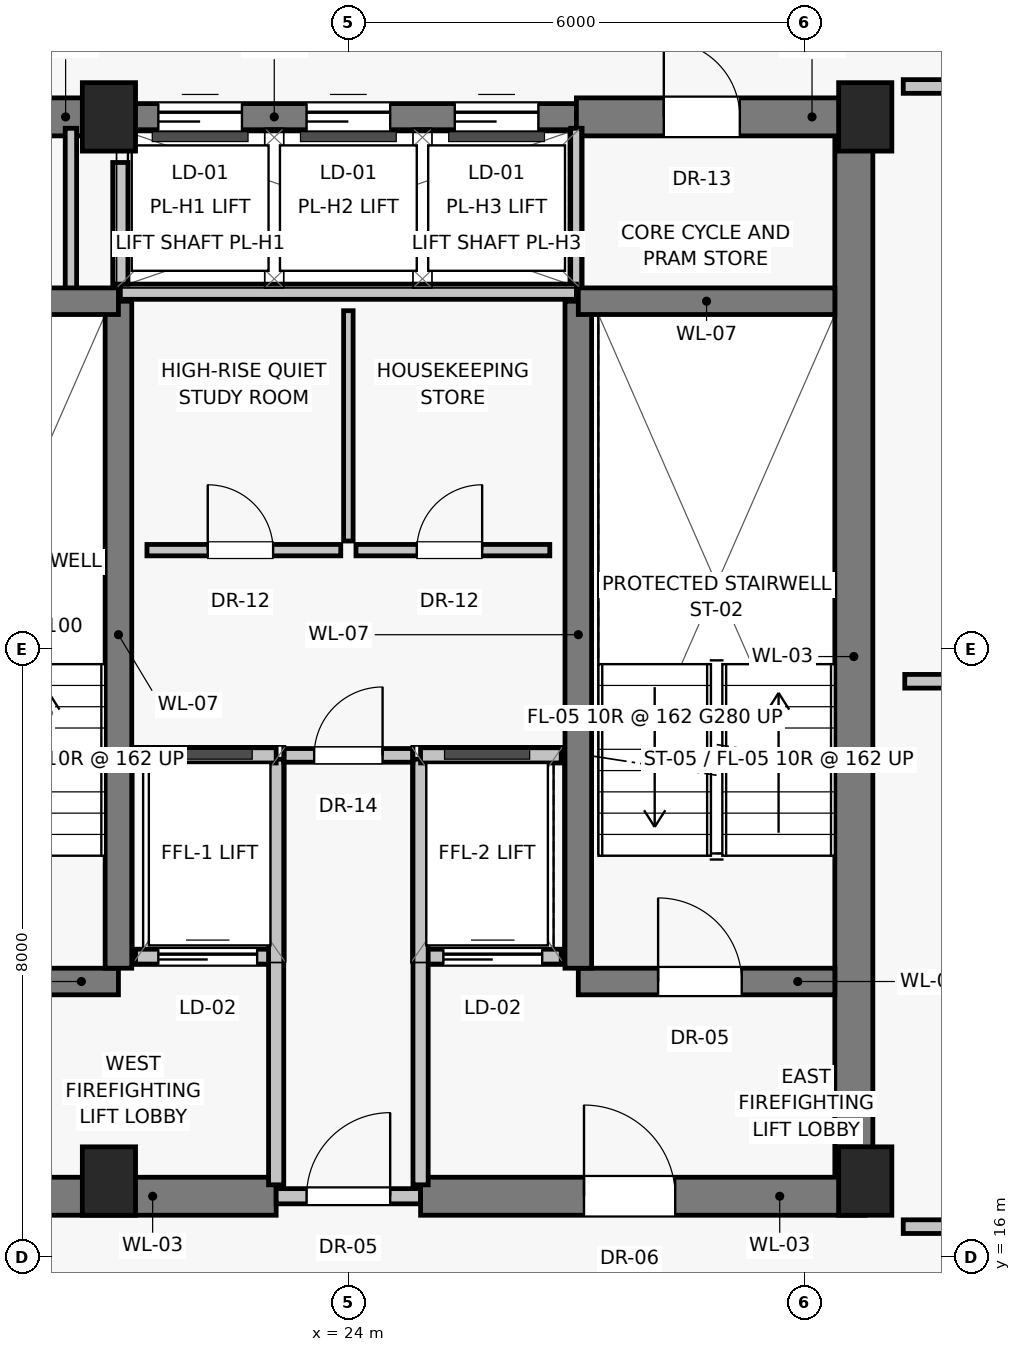
"""IFC4 building model, lengths in metres.
Left out: names, types, materials, properties, quantities, classifications, styles, units other than length and angle.
Written with IfcOpenShell. Run it as: python <this file> out.ifc"""

import sys

from ifc_helpers import new_model, si_unit, direction, frame, frame_2d, origin, origin_2d, place, context, subcontext, project, spatial, rectangle, extrude, source, transform, mapped, element, fill, save


model = new_model("IFC4")
c1 = context("Model", 3, precision=1e-05, world=origin(), true_north=direction((0.0, 1.0)))
c2 = subcontext(c1, "Body", "Model", "MODEL_VIEW")
j1 = project(units=[si_unit("LENGTHUNIT", "METRE"), si_unit("PLANEANGLEUNIT", "RADIAN")], contexts=[c1])
p1 = place(None, origin())
s1 = spatial("IfcSite", under=j1, at=p1, CompositionType="ELEMENT")
p2 = place(p1, origin())
s2 = spatial("IfcBuilding", under=s1, at=p2, CompositionType="ELEMENT")
p3 = place(p2, frame((0.0, 0.0, 248.0)))
s3 = spatial("IfcBuildingStorey", under=s2, at=p3, CompositionType="ELEMENT", Elevation=248.0)
for number, where, z_axis, x_axis in (
    (1, (20.85, 17.0, 0.0), (0.0, 0.0, 1.0), (1.0, 0.0, 0.0)),
    (2, (30.8, 17.0, 0.0), (0.0, 0.0, 1.0), (1.0, 0.0, 0.0)),
    (3, (20.85, 31.0, 0.0), (0.0, 0.0, 1.0), (1.0, 0.0, 0.0)),
    (4, (30.8, 31.0, 0.0), (0.0, 0.0, 1.0), (1.0, 0.0, 0.0)),
):
    element("IfcColumn", number, at=place(p3, frame(where, z_axis=z_axis, x_axis=x_axis)), inside=s3, PredefinedType="PILASTER", context=c2, shape_type="SweptSolid", body=[
        extrude(rectangle(XDim=0.7, YDim=0.9, at=origin_2d()), origin(), (0.0, 0.0, 1.0), 3.25),
    ])
p4 = place(p3, frame((30.65, 16.8, 0.0), z_axis=(0.0, 0.0, 1.0), x_axis=(0.0, 1.0, 0.0)))
e5 = element("IfcWall", 5, at=p4, inside=s3, PredefinedType="SHEAR", context=c2, shape_type="SweptSolid", body=[
    extrude(rectangle(XDim=14.2, YDim=0.5, at=frame_2d((7.1, 0.0))), origin(), (0.0, 0.0, 1.0), 3.015),
])
p5 = place(p3, frame((17.2, 16.8, 0.0), z_axis=(0.0, 0.0, 1.0), x_axis=(1.0, 0.0, 0.0)))
e6 = element("IfcWall", 6, at=p5, inside=s3, PredefinedType="SHEAR", context=c2, shape_type="SweptSolid", body=[
    extrude(rectangle(XDim=5.85, YDim=0.5, at=frame_2d((2.925, 0.0))), origin(), (0.0, 0.0, 1.0), 3.015),
])
p6 = place(p5, frame((1.15, 0.0, 0.0)))
e7 = element("IfcOpeningElement", 7, at=p6, cuts=e6, PredefinedType="OPENING", context=c2, shape_type="SweptSolid", body=[
    extrude(rectangle(XDim=1.2, YDim=2.03, at=frame_2d((0.6, 1.015))), frame((0.0, 0.26, 0.0), z_axis=(0.0, -1.0, 0.0), x_axis=(1.0, 0.0, 0.0)), (0.0, 0.0, 1.0), 0.52),
])
p7 = place(p3, frame((23.05, 16.8, 0.0), z_axis=(0.0, 0.0, 1.0), x_axis=(1.0, 0.0, 0.0)))
e8 = element("IfcWall", 8, at=p7, inside=s3, PredefinedType="SOLIDWALL", context=c2, shape_type="SweptSolid", body=[
    extrude(rectangle(XDim=1.9, YDim=0.2, at=frame_2d((0.95, 0.0))), origin(), (0.0, 0.0, 1.0), 2.165),
])
p8 = place(p7, frame((0.4, 0.0, 0.0)))
e9 = element("IfcOpeningElement", 9, at=p8, cuts=e8, PredefinedType="OPENING", context=c2, shape_type="SweptSolid", body=[
    extrude(rectangle(XDim=1.1, YDim=2.03, at=frame_2d((0.55, 1.015))), frame((0.0, 0.11, 0.0), z_axis=(0.0, -1.0, 0.0), x_axis=(1.0, 0.0, 0.0)), (0.0, 0.0, 1.0), 0.22),
])
p9 = place(p3, frame((24.95, 16.8, 0.0), z_axis=(0.0, 0.0, 1.0), x_axis=(1.0, 0.0, 0.0)))
e10 = element("IfcWall", 10, at=p9, inside=s3, PredefinedType="SHEAR", context=c2, shape_type="SweptSolid", body=[
    extrude(rectangle(XDim=5.85, YDim=0.5, at=frame_2d((2.925, 0.0))), origin(), (0.0, 0.0, 1.0), 3.015),
])
p10 = place(p9, frame((2.15, 0.0, 0.0)))
e11 = element("IfcOpeningElement", 11, at=p10, cuts=e10, PredefinedType="OPENING", context=c2, shape_type="SweptSolid", body=[
    extrude(rectangle(XDim=1.2, YDim=2.03, at=frame_2d((0.6, 1.015))), frame((0.0, 0.26, 0.0), z_axis=(0.0, -1.0, 0.0), x_axis=(1.0, 0.0, 0.0)), (0.0, 0.0, 1.0), 0.52),
])
p11 = place(p3, frame((17.2, 31.0, 0.0), z_axis=(0.0, 0.0, 1.0), x_axis=(1.0, 0.0, 0.0)))
e12 = element("IfcWall", 12, at=p11, inside=s3, PredefinedType="SHEAR", context=c2, shape_type="SweptSolid", body=[
    extrude(rectangle(XDim=3.8, YDim=0.5, at=frame_2d((1.9, 0.0))), origin(), (0.0, 0.0, 1.0), 3.015),
])
p12 = place(p11, frame((1.25, 0.0, 0.0)))
e13 = element("IfcOpeningElement", 13, at=p12, cuts=e12, PredefinedType="OPENING", context=c2, shape_type="SweptSolid", body=[
    extrude(rectangle(XDim=0.86, YDim=2.01, at=frame_2d((0.43, 1.005))), frame((0.0, 0.26, 0.0), z_axis=(0.0, -1.0, 0.0), x_axis=(1.0, 0.0, 0.0)), (0.0, 0.0, 1.0), 0.52),
])
p13 = place(p3, frame((21.0, 31.0, 0.0), z_axis=(0.0, 0.0, 1.0), x_axis=(1.0, 0.0, 0.0)))
e14 = element("IfcWall", 14, at=p13, inside=s3, PredefinedType="SHEAR", context=c2, shape_type="SweptSolid", body=[
    extrude(rectangle(XDim=6.0, YDim=0.35, at=frame_2d((3.0, 0.0))), origin(), (0.0, 0.0, 1.0), 3.015),
])
p14 = place(p13, frame((0.5, 0.0, 0.0)))
e15 = element("IfcOpeningElement", 15, at=p14, cuts=e14, PredefinedType="OPENING", context=c2, shape_type="SweptSolid", body=[
    extrude(rectangle(XDim=1.1, YDim=2.08, at=frame_2d((0.55, 1.04))), frame((0.0, 0.185, 0.0), z_axis=(0.0, -1.0, 0.0), x_axis=(1.0, 0.0, 0.0)), (0.0, 0.0, 1.0), 0.37),
])
p15 = place(p13, frame((2.45, 0.0, 0.0)))
e16 = element("IfcOpeningElement", 16, at=p15, cuts=e14, PredefinedType="OPENING", context=c2, shape_type="SweptSolid", body=[
    extrude(rectangle(XDim=1.1, YDim=2.08, at=frame_2d((0.55, 1.04))), frame((0.0, 0.185, 0.0), z_axis=(0.0, -1.0, 0.0), x_axis=(1.0, 0.0, 0.0)), (0.0, 0.0, 1.0), 0.37),
])
p16 = place(p13, frame((4.4, 0.0, 0.0)))
e17 = element("IfcOpeningElement", 17, at=p16, cuts=e14, PredefinedType="OPENING", context=c2, shape_type="SweptSolid", body=[
    extrude(rectangle(XDim=1.1, YDim=2.08, at=frame_2d((0.55, 1.04))), frame((0.0, 0.185, 0.0), z_axis=(0.0, -1.0, 0.0), x_axis=(1.0, 0.0, 0.0)), (0.0, 0.0, 1.0), 0.37),
])
p17 = place(p3, frame((27.0, 31.0, 0.0), z_axis=(0.0, 0.0, 1.0), x_axis=(1.0, 0.0, 0.0)))
e18 = element("IfcWall", 18, at=p17, inside=s3, PredefinedType="SHEAR", context=c2, shape_type="SweptSolid", body=[
    extrude(rectangle(XDim=3.8, YDim=0.5, at=frame_2d((1.9, 0.0))), origin(), (0.0, 0.0, 1.0), 3.015),
])
p18 = place(p17, frame((1.15, 0.0, 0.0)))
e19 = element("IfcOpeningElement", 19, at=p18, cuts=e18, PredefinedType="OPENING", context=c2, shape_type="SweptSolid", body=[
    extrude(rectangle(XDim=1.0, YDim=2.01, at=frame_2d((0.5, 1.005))), frame((0.0, 0.26, 0.0), z_axis=(0.0, -1.0, 0.0), x_axis=(1.0, 0.0, 0.0)), (0.0, 0.0, 1.0), 0.52),
])
for number, where, z_axis, x_axis in (
    (20, (20.35, 28.65, 0.0), (0.0, 0.0, 1.0), (0.0, 1.0, 0.0)),
    (21, (27.0, 28.65, 0.0), (0.0, 0.0, 1.0), (0.0, 1.0, 0.0)),
):
    element("IfcWall", number, at=place(p3, frame(where, z_axis=z_axis, x_axis=x_axis)), inside=s3, PredefinedType="PARTITIONING", context=c2, shape_type="SweptSolid", body=[
        extrude(rectangle(XDim=2.2, YDim=0.15, at=frame_2d((1.1, 0.0))), origin(), (0.0, 0.0, 1.0), 3.015),
    ])
p19 = place(p3, frame((17.6, 19.625, 0.0), z_axis=(0.0, 0.0, 1.0), x_axis=(1.0, 0.0, 0.0)))
e22 = element("IfcWall", 22, at=p19, inside=s3, PredefinedType="SHEAR", context=c2, shape_type="SweptSolid", body=[
    extrude(rectangle(XDim=3.375, YDim=0.35, at=frame_2d((1.688, 0.0))), origin(), (0.0, 0.0, 1.0), 3.015),
])
p20 = place(p19, frame((1.05, 0.0, 0.0)))
e23 = element("IfcOpeningElement", 23, at=p20, cuts=e22, PredefinedType="OPENING", context=c2, shape_type="SweptSolid", body=[
    extrude(rectangle(XDim=1.1, YDim=2.03, at=frame_2d((0.55, 1.015))), frame((0.0, 0.185, 0.0), z_axis=(0.0, -1.0, 0.0), x_axis=(1.0, 0.0, 0.0)), (0.0, 0.0, 1.0), 0.37),
])
p21 = place(p3, frame((21.2, 19.95, 0.0), z_axis=(0.0, 0.0, 1.0), x_axis=(1.0, 0.0, 0.0)))
e24 = element("IfcWall", 24, at=p21, inside=s3, PredefinedType="SOLIDWALL", context=c2, shape_type="SweptSolid", body=[
    extrude(rectangle(XDim=1.85, YDim=0.2, at=frame_2d((0.925, 0.0))), origin(), (0.0, 0.0, 1.0), 3.015),
])
p22 = place(p21, frame((0.3, 0.0, 0.0)))
e25 = element("IfcOpeningElement", 25, at=p22, cuts=e24, PredefinedType="OPENING", context=c2, shape_type="SweptSolid", body=[
    extrude(rectangle(XDim=1.3, YDim=2.25, at=frame_2d((0.65, 1.125))), frame((0.0, 0.11, 0.0), z_axis=(0.0, -1.0, 0.0), x_axis=(1.0, 0.0, 0.0)), (0.0, 0.0, 1.0), 0.22),
])
p23 = place(p3, frame((24.95, 19.95, 0.0), z_axis=(0.0, 0.0, 1.0), x_axis=(1.0, 0.0, 0.0)))
e26 = element("IfcWall", 26, at=p23, inside=s3, PredefinedType="SOLIDWALL", context=c2, shape_type="SweptSolid", body=[
    extrude(rectangle(XDim=1.85, YDim=0.2, at=frame_2d((0.925, 0.0))), origin(), (0.0, 0.0, 1.0), 3.015),
])
p24 = place(p23, frame((0.3, 0.0, 0.0)))
e27 = element("IfcOpeningElement", 27, at=p24, cuts=e26, PredefinedType="OPENING", context=c2, shape_type="SweptSolid", body=[
    extrude(rectangle(XDim=1.3, YDim=2.25, at=frame_2d((0.65, 1.125))), frame((0.0, 0.11, 0.0), z_axis=(0.0, -1.0, 0.0), x_axis=(1.0, 0.0, 0.0)), (0.0, 0.0, 1.0), 0.22),
])
p25 = place(p3, frame((27.025, 19.625, 0.0), z_axis=(0.0, 0.0, 1.0), x_axis=(1.0, 0.0, 0.0)))
e28 = element("IfcWall", 28, at=p25, inside=s3, PredefinedType="SHEAR", context=c2, shape_type="SweptSolid", body=[
    extrude(rectangle(XDim=3.375, YDim=0.35, at=frame_2d((1.688, 0.0))), origin(), (0.0, 0.0, 1.0), 3.015),
])
p26 = place(p25, frame((1.05, 0.0, 0.0)))
e29 = element("IfcOpeningElement", 29, at=p26, cuts=e28, PredefinedType="OPENING", context=c2, shape_type="SweptSolid", body=[
    extrude(rectangle(XDim=1.1, YDim=2.03, at=frame_2d((0.55, 1.015))), frame((0.0, 0.185, 0.0), z_axis=(0.0, -1.0, 0.0), x_axis=(1.0, 0.0, 0.0)), (0.0, 0.0, 1.0), 0.37),
])
for number, where, z_axis, x_axis in (
    (30, (20.975, 19.8, 0.0), (0.0, 0.0, 1.0), (0.0, 1.0, 0.0)),
    (31, (27.025, 19.8, 0.0), (0.0, 0.0, 1.0), (0.0, 1.0, 0.0)),
):
    element("IfcWall", number, at=place(p3, frame(where, z_axis=z_axis, x_axis=x_axis)), inside=s3, PredefinedType="SHEAR", context=c2, shape_type="SweptSolid", body=[
        extrude(rectangle(XDim=8.775, YDim=0.35, at=frame_2d((4.387, 0.0))), origin(), (0.0, 0.0, 1.0), 3.015),
    ])
for number, where, z_axis, x_axis in (
    (32, (17.6, 28.575, 0.0), (0.0, 0.0, 1.0), (1.0, 0.0, 0.0)),
    (33, (27.025, 28.575, 0.0), (0.0, 0.0, 1.0), (1.0, 0.0, 0.0)),
):
    element("IfcWall", number, at=place(p3, frame(where, z_axis=z_axis, x_axis=x_axis)), inside=s3, PredefinedType="SHEAR", context=c2, shape_type="SweptSolid", body=[
        extrude(rectangle(XDim=3.375, YDim=0.35, at=frame_2d((1.688, 0.0))), origin(), (0.0, 0.0, 1.0), 3.015),
    ])
for number, where, z_axis, x_axis in (
    (34, (23.05, 16.95, 0.0), (0.0, 0.0, 1.0), (0.0, 1.0, 0.0)),
    (35, (24.95, 16.95, 0.0), (0.0, 0.0, 1.0), (0.0, 1.0, 0.0)),
):
    element("IfcWall", number, at=place(p3, frame(where, z_axis=z_axis, x_axis=x_axis)), inside=s3, PredefinedType="SOLIDWALL", context=c2, shape_type="SweptSolid", body=[
        extrude(rectangle(XDim=5.6, YDim=0.2, at=frame_2d((2.8, 0.0))), origin(), (0.0, 0.0, 1.0), 3.015),
    ])
for number, where, z_axis, x_axis in (
    (36, (21.2, 22.6, 0.0), (0.0, 0.0, 1.0), (1.0, 0.0, 0.0)),
    (37, (24.95, 22.6, 0.0), (0.0, 0.0, 1.0), (1.0, 0.0, 0.0)),
):
    element("IfcWall", number, at=place(p3, frame(where, z_axis=z_axis, x_axis=x_axis)), inside=s3, PredefinedType="SOLIDWALL", context=c2, shape_type="SweptSolid", body=[
        extrude(rectangle(XDim=1.85, YDim=0.2, at=frame_2d((0.925, 0.0))), origin(), (0.0, 0.0, 1.0), 3.015),
    ])
p27 = place(p3, frame((21.0, 28.7, 0.0), z_axis=(0.0, 0.0, 1.0), x_axis=(1.0, 0.0, 0.0)))
e38 = element("IfcWall", 38, at=p27, inside=s3, PredefinedType="SOLIDWALL", context=c2, shape_type="SweptSolid", body=[
    extrude(rectangle(XDim=6.0, YDim=0.2, at=frame_2d((3.0, 0.0))), origin(), (0.0, 0.0, 1.0), 3.015),
])
p28 = place(p3, frame((21.0, 28.8, 0.0), z_axis=(0.0, 0.0, 1.0), x_axis=(0.0, 1.0, 0.0)))
e39 = element("IfcWall", 39, at=p28, inside=s3, PredefinedType="SOLIDWALL", context=c2, shape_type="SweptSolid", body=[
    extrude(rectangle(XDim=1.6, YDim=0.2, at=frame_2d((0.8, 0.0))), origin(), (0.0, 0.0, 1.0), 3.015),
])
p29 = place(p3, frame((23.15, 22.6, 0.0), z_axis=(0.0, 0.0, 1.0), x_axis=(1.0, 0.0, 0.0)))
e40 = element("IfcWall", 40, at=p29, inside=s3, PredefinedType="PARTITIONING", context=c2, shape_type="SweptSolid", body=[
    extrude(rectangle(XDim=1.7, YDim=0.18, at=frame_2d((0.85, 0.0))), origin(), (0.0, 0.0, 1.0), 3.015),
])
p30 = place(p29, frame((0.4, 0.0, 0.0)))
e41 = element("IfcOpeningElement", 41, at=p30, cuts=e40, PredefinedType="OPENING", context=c2, shape_type="SweptSolid", body=[
    extrude(rectangle(XDim=0.9, YDim=2.01, at=frame_2d((0.45, 1.005))), frame((0.0, 0.1, 0.0), z_axis=(0.0, -1.0, 0.0), x_axis=(1.0, 0.0, 0.0)), (0.0, 0.0, 1.0), 0.2),
])
p31 = place(p3, frame((21.35, 25.3, 0.0), z_axis=(0.0, 0.0, 1.0), x_axis=(1.0, 0.0, 0.0)))
e42 = element("IfcWall", 42, at=p31, inside=s3, PredefinedType="PARTITIONING", context=c2, shape_type="SweptSolid", body=[
    extrude(rectangle(XDim=2.55, YDim=0.15, at=frame_2d((1.275, 0.0))), origin(), (0.0, 0.0, 1.0), 3.015),
])
p32 = place(p31, frame((0.8, 0.0, 0.0)))
e43 = element("IfcOpeningElement", 43, at=p32, cuts=e42, PredefinedType="OPENING", context=c2, shape_type="SweptSolid", body=[
    extrude(rectangle(XDim=0.86, YDim=2.01, at=frame_2d((0.43, 1.005))), frame((0.0, 0.085, 0.0), z_axis=(0.0, -1.0, 0.0), x_axis=(1.0, 0.0, 0.0)), (0.0, 0.0, 1.0), 0.17),
])
p33 = place(p3, frame((24.1, 25.3, 0.0), z_axis=(0.0, 0.0, 1.0), x_axis=(1.0, 0.0, 0.0)))
e44 = element("IfcWall", 44, at=p33, inside=s3, PredefinedType="PARTITIONING", context=c2, shape_type="SweptSolid", body=[
    extrude(rectangle(XDim=2.55, YDim=0.15, at=frame_2d((1.275, 0.0))), origin(), (0.0, 0.0, 1.0), 3.015),
])
p34 = place(p33, frame((0.8, 0.0, 0.0)))
e45 = element("IfcOpeningElement", 45, at=p34, cuts=e44, PredefinedType="OPENING", context=c2, shape_type="SweptSolid", body=[
    extrude(rectangle(XDim=0.86, YDim=2.01, at=frame_2d((0.43, 1.005))), frame((0.0, 0.085, 0.0), z_axis=(0.0, -1.0, 0.0), x_axis=(1.0, 0.0, 0.0)), (0.0, 0.0, 1.0), 0.17),
])
p35 = place(p3, frame((24.0, 25.42, 0.0), z_axis=(0.0, 0.0, 1.0), x_axis=(0.0, 1.0, 0.0)))
e46 = element("IfcWall", 46, at=p35, inside=s3, PredefinedType="PARTITIONING", context=c2, shape_type="SweptSolid", body=[
    extrude(rectangle(XDim=3.03, YDim=0.125, at=frame_2d((1.515, 0.0))), origin(), (0.0, 0.0, 1.0), 3.015),
])
p36 = place(p3, frame((31.32, 23.575, 0.0), z_axis=(0.0, 0.0, 1.0), x_axis=(1.0, 0.0, 0.0)))
e47 = element("IfcWall", 47, at=p36, inside=s3, PredefinedType="PARTITIONING", context=c2, shape_type="SweptSolid", body=[
    extrude(rectangle(XDim=9.409, YDim=0.18, at=frame_2d((4.705, 0.0))), origin(), (0.0, 0.0, 1.0), 3.015),
])
p37 = place(p3, frame((31.3, 16.4, 0.0), z_axis=(0.0, 0.0, 1.0), x_axis=(1.0, 0.0, 0.0)))
e48 = element("IfcWall", 48, at=p37, inside=s3, PredefinedType="PARTITIONING", context=c2, shape_type="SweptSolid", body=[
    extrude(rectangle(XDim=1.92, YDim=0.18, at=frame_2d((0.96, 0.0))), origin(), (0.0, 0.0, 1.0), 3.015),
])
p38 = place(p37, frame((0.72, 0.0, 0.0)))
e49 = element("IfcOpeningElement", 49, at=p38, cuts=e48, PredefinedType="OPENING", context=c2, shape_type="SweptSolid", body=[
    extrude(rectangle(XDim=1.0, YDim=2.01, at=frame_2d((0.5, 1.005))), frame((0.0, 0.1, 0.0), z_axis=(0.0, -1.0, 0.0), x_axis=(1.0, 0.0, 0.0)), (0.0, 0.0, 1.0), 0.2),
])
p39 = place(p3, frame((31.3, 31.4, 0.0), z_axis=(0.0, 0.0, 1.0), x_axis=(1.0, 0.0, 0.0)))
e50 = element("IfcWall", 50, at=p39, inside=s3, PredefinedType="PARTITIONING", context=c2, shape_type="SweptSolid", body=[
    extrude(rectangle(XDim=1.92, YDim=0.18, at=frame_2d((0.96, 0.0))), origin(), (0.0, 0.0, 1.0), 3.015),
])
p40 = place(p39, frame((0.72, 0.0, 0.0)))
e51 = element("IfcOpeningElement", 51, at=p40, cuts=e50, PredefinedType="OPENING", context=c2, shape_type="SweptSolid", body=[
    extrude(rectangle(XDim=1.0, YDim=2.01, at=frame_2d((0.5, 1.005))), frame((0.0, 0.1, 0.0), z_axis=(0.0, -1.0, 0.0), x_axis=(1.0, 0.0, 0.0)), (0.0, 0.0, 1.0), 0.2),
])
m1 = source(origin(), c2, "Body", "SweptSolid", [
    extrude(rectangle(XDim=1.1, YDim=2.03, at=frame_2d((0.55, 1.015))), frame((0.0, 0.025, 0.0), z_axis=(0.0, -1.0, 0.0), x_axis=(1.0, 0.0, 0.0)), (0.0, 0.0, 1.0), 0.05),
])
p41 = place(p8, origin())
e52 = element("IfcDoor", 52, at=p41, inside=s3, OperationType="SINGLE_SWING_RIGHT", PredefinedType="DOOR", context=c2, shape_type="MappedRepresentation", body=[
    mapped(m1, transform((0.0, 0.0, 0.0), scale=1.0)),
])
fill(e9, e52)
m2 = source(origin(), c2, "Body", "SweptSolid", [
    extrude(rectangle(XDim=1.2, YDim=2.03, at=frame_2d((0.6, 1.015))), frame((0.0, 0.025, 0.0), z_axis=(0.0, -1.0, 0.0), x_axis=(1.0, 0.0, 0.0)), (0.0, 0.0, 1.0), 0.05),
])
p42 = place(p10, origin())
e53 = element("IfcDoor", 53, at=p42, inside=s3, OperationType="SINGLE_SWING_LEFT", PredefinedType="DOOR", context=c2, shape_type="MappedRepresentation", body=[
    mapped(m2, transform((0.0, 0.0, 0.0), scale=1.0)),
])
fill(e11, e53)
m3 = source(origin(), c2, "Body", "SweptSolid", [
    extrude(rectangle(XDim=1.1, YDim=2.08, at=frame_2d((0.55, 1.04))), frame((0.0, 0.025, 0.0), z_axis=(0.0, -1.0, 0.0), x_axis=(1.0, 0.0, 0.0)), (0.0, 0.0, 1.0), 0.05),
])
p43 = place(p14, origin())
e54 = element("IfcDoor", 54, at=p43, inside=s3, OperationType="SLIDING_TO_LEFT", PredefinedType="DOOR", context=c2, shape_type="MappedRepresentation", body=[
    mapped(m3, transform((0.0, 0.0, 0.0), scale=1.0)),
])
fill(e15, e54)
p44 = place(p15, origin())
e55 = element("IfcDoor", 55, at=p44, inside=s3, OperationType="SLIDING_TO_LEFT", PredefinedType="DOOR", context=c2, shape_type="MappedRepresentation", body=[
    mapped(m3, transform((0.0, 0.0, 0.0), scale=1.0)),
])
fill(e16, e55)
p45 = place(p16, origin())
e56 = element("IfcDoor", 56, at=p45, inside=s3, OperationType="SLIDING_TO_LEFT", PredefinedType="DOOR", context=c2, shape_type="MappedRepresentation", body=[
    mapped(m3, transform((0.0, 0.0, 0.0), scale=1.0)),
])
fill(e17, e56)
m4 = source(origin(), c2, "Body", "SweptSolid", [
    extrude(rectangle(XDim=1.0, YDim=2.01, at=frame_2d((0.5, 1.005))), frame((0.0, 0.025, 0.0), z_axis=(0.0, -1.0, 0.0), x_axis=(1.0, 0.0, 0.0)), (0.0, 0.0, 1.0), 0.05),
])
p46 = place(p18, origin())
e57 = element("IfcDoor", 57, at=p46, inside=s3, OperationType="SINGLE_SWING_LEFT", PredefinedType="DOOR", context=c2, shape_type="MappedRepresentation", body=[
    mapped(m4, transform((0.0, 0.0, 0.0), scale=1.0)),
])
fill(e19, e57)
m5 = source(origin(), c2, "Body", "SweptSolid", [
    extrude(rectangle(XDim=1.3, YDim=2.25, at=frame_2d((0.65, 1.125))), frame((0.0, 0.025, 0.0), z_axis=(0.0, -1.0, 0.0), x_axis=(1.0, 0.0, 0.0)), (0.0, 0.0, 1.0), 0.05),
])
p47 = place(p22, origin())
e58 = element("IfcDoor", 58, at=p47, inside=s3, OperationType="SLIDING_TO_LEFT", PredefinedType="DOOR", context=c2, shape_type="MappedRepresentation", body=[
    mapped(m5, transform((0.0, 0.0, 0.0), scale=1.0)),
])
fill(e25, e58)
p48 = place(p24, origin())
e59 = element("IfcDoor", 59, at=p48, inside=s3, OperationType="SLIDING_TO_LEFT", PredefinedType="DOOR", context=c2, shape_type="MappedRepresentation", body=[
    mapped(m5, transform((0.0, 0.0, 0.0), scale=1.0)),
])
fill(e27, e59)
p49 = place(p26, origin())
e60 = element("IfcDoor", 60, at=p49, inside=s3, OperationType="SINGLE_SWING_LEFT", PredefinedType="DOOR", context=c2, shape_type="MappedRepresentation", body=[
    mapped(m1, transform((0.0, 0.0, 0.0), scale=1.0)),
])
fill(e29, e60)
m6 = source(origin(), c2, "Body", "SweptSolid", [
    extrude(rectangle(XDim=0.9, YDim=2.01, at=frame_2d((0.45, 1.005))), frame((0.0, 0.025, 0.0), z_axis=(0.0, -1.0, 0.0), x_axis=(1.0, 0.0, 0.0)), (0.0, 0.0, 1.0), 0.05),
])
p50 = place(p30, origin())
e61 = element("IfcDoor", 61, at=p50, inside=s3, OperationType="SINGLE_SWING_RIGHT", PredefinedType="DOOR", context=c2, shape_type="MappedRepresentation", body=[
    mapped(m6, transform((0.0, 0.0, 0.0), scale=1.0)),
])
fill(e41, e61)
m7 = source(origin(), c2, "Body", "SweptSolid", [
    extrude(rectangle(XDim=0.86, YDim=2.01, at=frame_2d((0.43, 1.005))), frame((0.0, 0.025, 0.0), z_axis=(0.0, -1.0, 0.0), x_axis=(1.0, 0.0, 0.0)), (0.0, 0.0, 1.0), 0.05),
])
p51 = place(p32, origin())
e62 = element("IfcDoor", 62, at=p51, inside=s3, OperationType="SINGLE_SWING_LEFT", PredefinedType="DOOR", context=c2, shape_type="MappedRepresentation", body=[
    mapped(m7, transform((0.0, 0.0, 0.0), scale=1.0)),
])
fill(e43, e62)
p52 = place(p34, origin())
e63 = element("IfcDoor", 63, at=p52, inside=s3, OperationType="SINGLE_SWING_RIGHT", PredefinedType="DOOR", context=c2, shape_type="MappedRepresentation", body=[
    mapped(m7, transform((0.0, 0.0, 0.0), scale=1.0)),
])
fill(e45, e63)
save(model, sys.argv[1])
